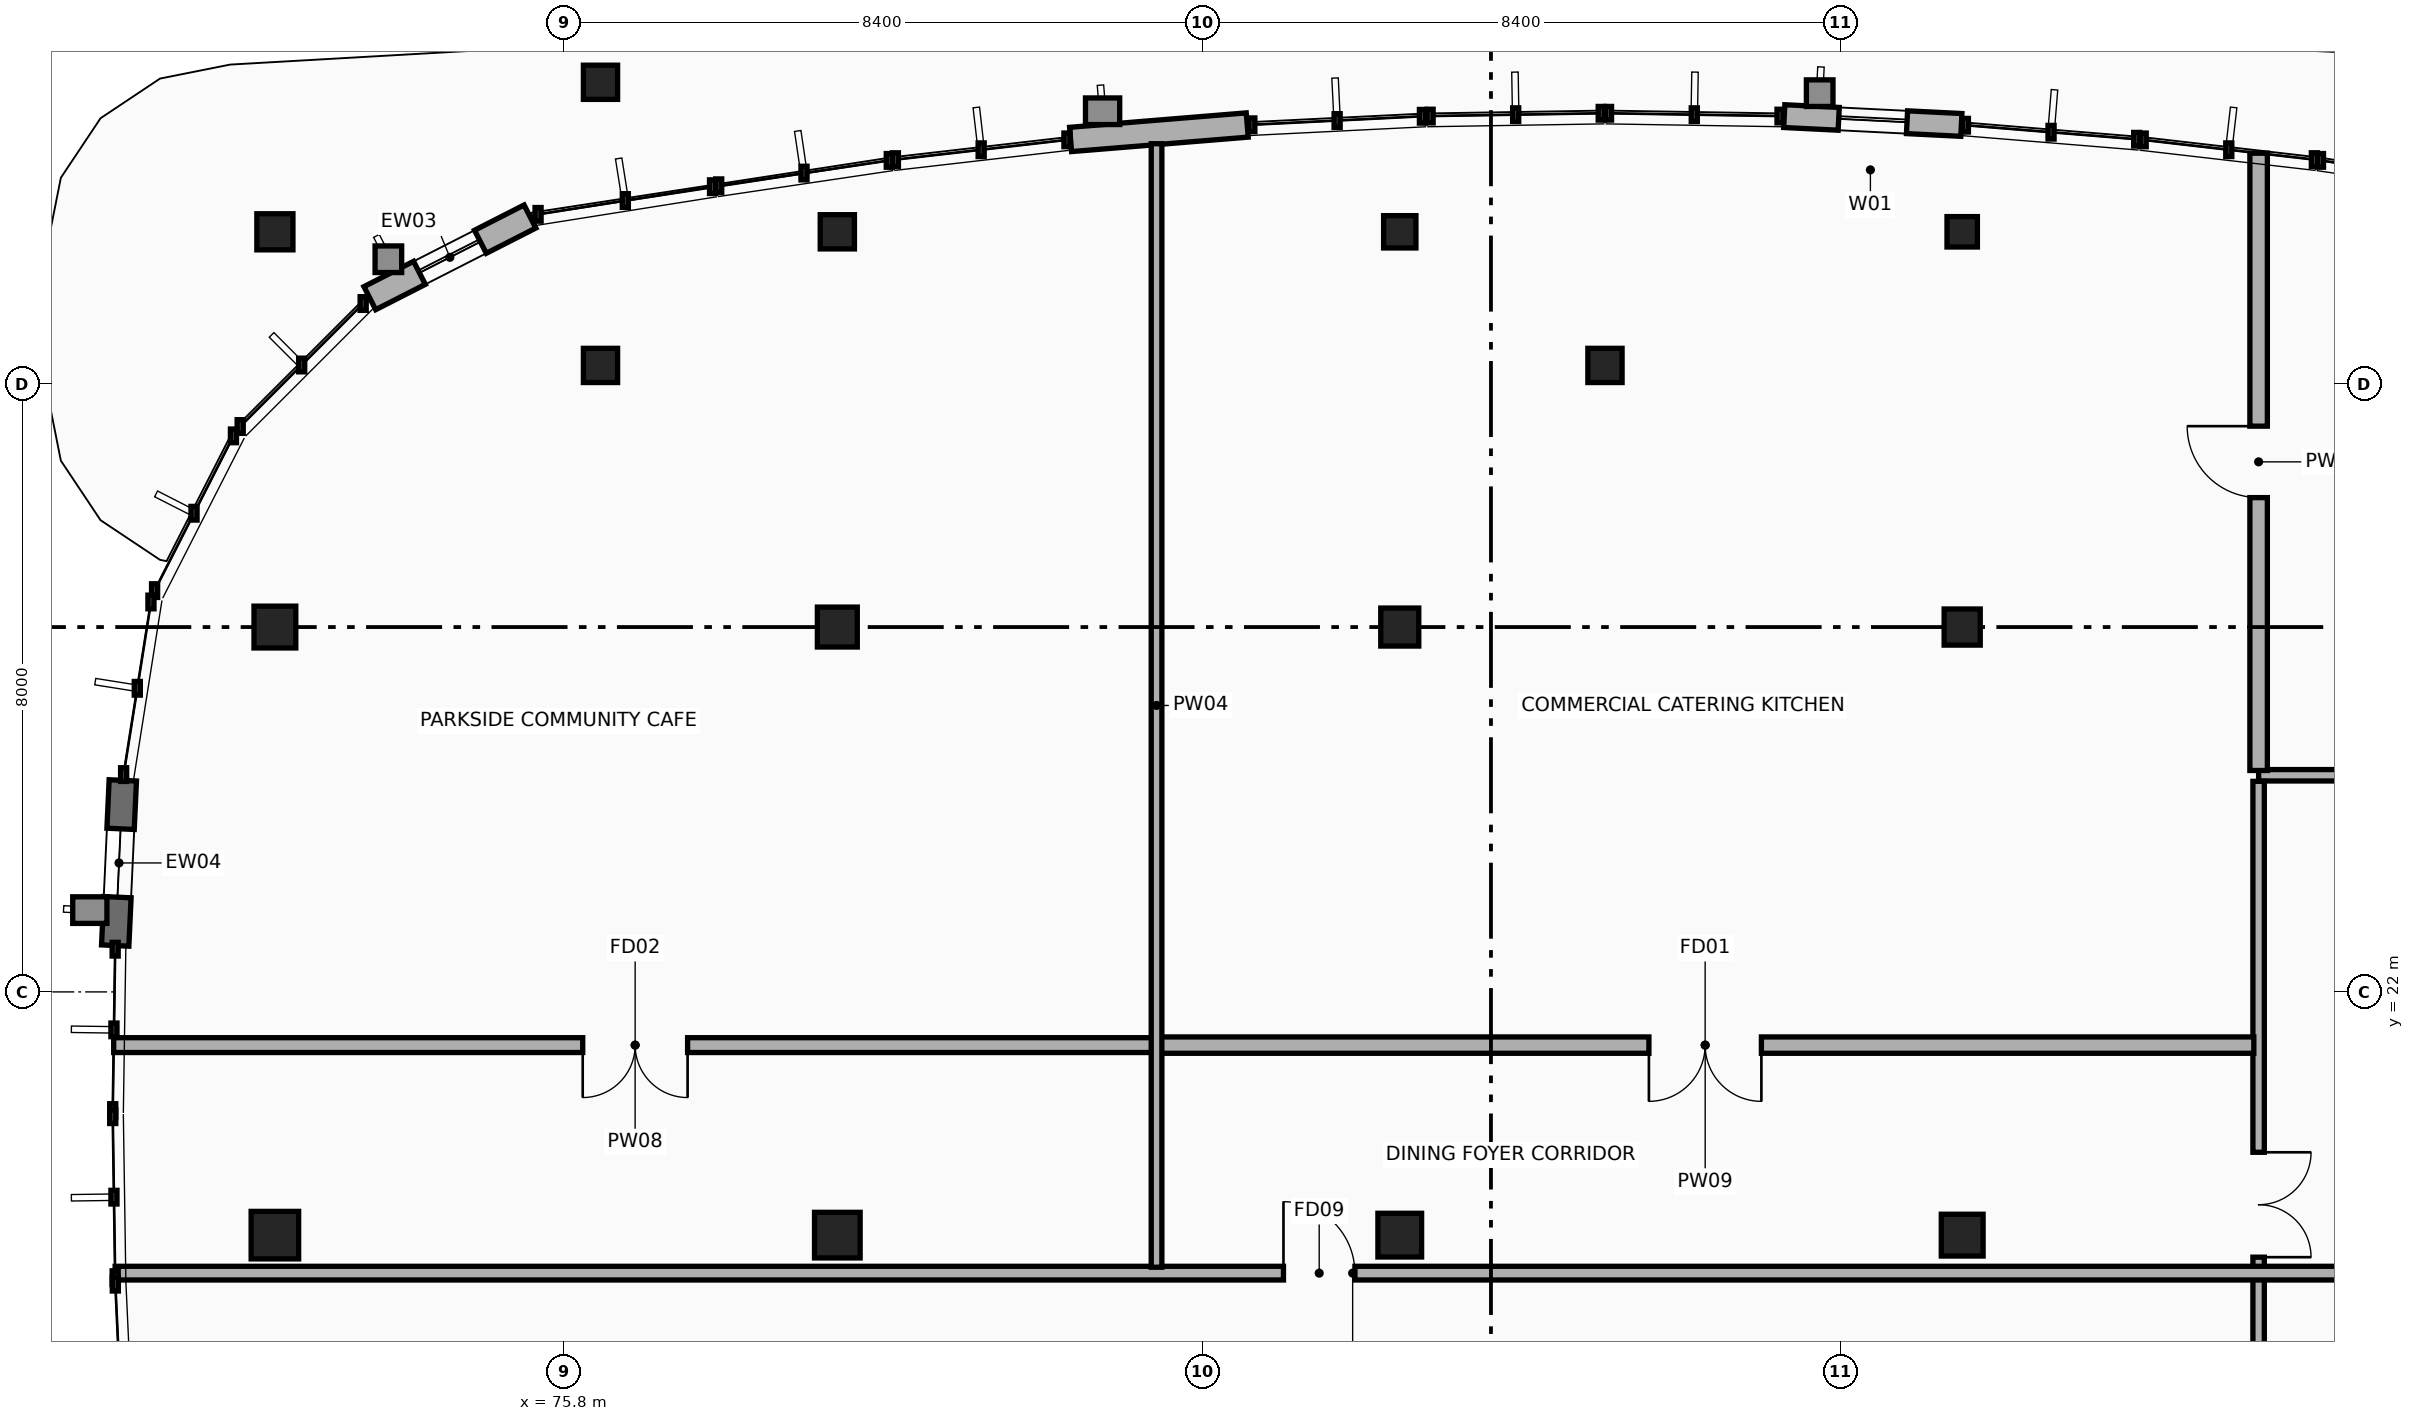
"""IFC4 building model, lengths in metres.
Left out: names, types, materials, properties, quantities, classifications, styles, units other than length and angle.
Written with IfcOpenShell. Run it as: python <this file> out.ifc"""

import sys

from ifc_helpers import new_model, si_unit, direction, frame, frame_2d, origin, origin_2d, place, context, subcontext, project, spatial, rectangle, extrude, element, fill, save


model = new_model("IFC4")
c1 = context("Model", 3, precision=1e-05, world=origin(), true_north=direction((0.0, 1.0)))
c2 = subcontext(c1, "Body", "Model", "MODEL_VIEW")
j1 = project(units=[si_unit("LENGTHUNIT", "METRE"), si_unit("PLANEANGLEUNIT", "RADIAN")], contexts=[c1])
p1 = place(None, origin())
s1 = spatial("IfcSite", under=j1, at=p1, CompositionType="ELEMENT")
p2 = place(p1, origin())
s2 = spatial("IfcBuilding", under=s1, at=p2, CompositionType="ELEMENT")
p3 = place(p2, origin())
s3 = spatial("IfcBuildingStorey", under=s2, at=p3, CompositionType="ELEMENT", Elevation=0.0)
p4 = place(p3, frame((72.0, 18.8, 0.0), z_axis=(0.0, 0.0, 1.0), x_axis=(1.0, 0.0, 0.0)))
e1 = element("IfcColumn", 1, at=p4, inside=s3, PredefinedType="COLUMN", context=c2, shape_type="SweptSolid", body=[
    extrude(rectangle(XDim=0.625, YDim=0.625, at=origin_2d()), origin(), (0.0, 0.0, 1.0), 4.8),
])
p5 = place(p3, frame((72.0, 26.8, 0.0), z_axis=(0.0, 0.0, 1.0), x_axis=(1.0, 0.0, 0.0)))
e2 = element("IfcColumn", 2, at=p5, inside=s3, PredefinedType="COLUMN", context=c2, shape_type="SweptSolid", body=[
    extrude(rectangle(XDim=0.55, YDim=0.55, at=origin_2d()), origin(), (0.0, 0.0, 1.0), 4.8),
])
p6 = place(p3, frame((72.0, 32.0, 0.0), z_axis=(0.0, 0.0, 1.0), x_axis=(1.0, 0.0, 0.0)))
e3 = element("IfcColumn", 3, at=p6, inside=s3, PredefinedType="COLUMN", context=c2, shape_type="SweptSolid", body=[
    extrude(rectangle(XDim=0.475, YDim=0.475, at=origin_2d()), origin(), (0.0, 0.0, 1.0), 4.8),
])
p7 = place(p3, frame((79.4, 18.8, 0.0), z_axis=(0.0, 0.0, 1.0), x_axis=(1.0, 0.0, 0.0)))
e4 = element("IfcColumn", 4, at=p7, inside=s3, PredefinedType="COLUMN", context=c2, shape_type="SweptSolid", body=[
    extrude(rectangle(XDim=0.6, YDim=0.6, at=origin_2d()), origin(), (0.0, 0.0, 1.0), 4.8),
])
p8 = place(p3, frame((79.4, 26.8, 0.0), z_axis=(0.0, 0.0, 1.0), x_axis=(1.0, 0.0, 0.0)))
e5 = element("IfcColumn", 5, at=p8, inside=s3, PredefinedType="COLUMN", context=c2, shape_type="SweptSolid", body=[
    extrude(rectangle(XDim=0.525, YDim=0.525, at=origin_2d()), origin(), (0.0, 0.0, 1.0), 4.8),
])
p9 = place(p3, frame((79.4, 32.0, 0.0), z_axis=(0.0, 0.0, 1.0), x_axis=(1.0, 0.0, 0.0)))
e6 = element("IfcColumn", 6, at=p9, inside=s3, PredefinedType="COLUMN", context=c2, shape_type="SweptSolid", body=[
    extrude(rectangle(XDim=0.45, YDim=0.45, at=origin_2d()), origin(), (0.0, 0.0, 1.0), 4.8),
])
p10 = place(p3, frame((86.8, 18.8, 0.0), z_axis=(0.0, 0.0, 1.0), x_axis=(1.0, 0.0, 0.0)))
e7 = element("IfcColumn", 7, at=p10, inside=s3, PredefinedType="COLUMN", context=c2, shape_type="SweptSolid", body=[
    extrude(rectangle(XDim=0.575, YDim=0.575, at=origin_2d()), origin(), (0.0, 0.0, 1.0), 4.8),
])
p11 = place(p3, frame((86.8, 26.8, 0.0), z_axis=(0.0, 0.0, 1.0), x_axis=(1.0, 0.0, 0.0)))
e8 = element("IfcColumn", 8, at=p11, inside=s3, PredefinedType="COLUMN", context=c2, shape_type="SweptSolid", body=[
    extrude(rectangle(XDim=0.5, YDim=0.5, at=origin_2d()), origin(), (0.0, 0.0, 1.0), 4.8),
])
p12 = place(p3, frame((86.8, 32.0, 0.0), z_axis=(0.0, 0.0, 1.0), x_axis=(1.0, 0.0, 0.0)))
e9 = element("IfcColumn", 9, at=p12, inside=s3, PredefinedType="COLUMN", context=c2, shape_type="SweptSolid", body=[
    extrude(rectangle(XDim=0.425, YDim=0.425, at=origin_2d()), origin(), (0.0, 0.0, 1.0), 4.8),
])
p13 = place(p3, frame((94.2, 18.8, 0.0), z_axis=(0.0, 0.0, 1.0), x_axis=(1.0, 0.0, 0.0)))
e10 = element("IfcColumn", 10, at=p13, inside=s3, PredefinedType="COLUMN", context=c2, shape_type="SweptSolid", body=[
    extrude(rectangle(XDim=0.55, YDim=0.55, at=origin_2d()), origin(), (0.0, 0.0, 1.0), 4.8),
])
p14 = place(p3, frame((94.2, 26.8, 0.0), z_axis=(0.0, 0.0, 1.0), x_axis=(1.0, 0.0, 0.0)))
e11 = element("IfcColumn", 11, at=p14, inside=s3, PredefinedType="COLUMN", context=c2, shape_type="SweptSolid", body=[
    extrude(rectangle(XDim=0.475, YDim=0.475, at=origin_2d()), origin(), (0.0, 0.0, 1.0), 4.8),
])
p15 = place(p3, frame((94.2, 32.0, 0.0), z_axis=(0.0, 0.0, 1.0), x_axis=(1.0, 0.0, 0.0)))
e12 = element("IfcColumn", 12, at=p15, inside=s3, PredefinedType="COLUMN", context=c2, shape_type="SweptSolid", body=[
    extrude(rectangle(XDim=0.4, YDim=0.4, at=origin_2d()), origin(), (0.0, 0.0, 1.0), 4.8),
])
for number, where, z_axis, x_axis in (
    (13, (76.284, 30.242, 0.0), (0.0, 0.0, 1.0), (1.0, 0.0, 0.0)),
    (14, (76.284, 33.967, 0.0), (0.0, 0.0, 1.0), (1.0, 0.0, 0.0)),
    (15, (89.5, 30.242, 0.0), (0.0, 0.0, 1.0), (1.0, 0.0, 0.0)),
):
    element("IfcColumn", number, at=place(p3, frame(where, z_axis=z_axis, x_axis=x_axis)), inside=s3, PredefinedType="COLUMN", context=c2, shape_type="SweptSolid", body=[
        extrude(rectangle(XDim=0.45, YDim=0.45, at=origin_2d()), origin(), (0.0, 0.0, 1.0), 4.553),
    ])
p16 = place(p3, frame((91.859, 33.522, 0.0), z_axis=(0.0, 0.0, 1.0), x_axis=(0.998763795086, -0.049707963398, 0.0)))
e16 = element("IfcWall", 16, at=p16, inside=s3, PredefinedType="STANDARD", context=c2, shape_type="SweptSolid", body=[
    extrude(rectangle(XDim=2.333, YDim=0.3, at=frame_2d((1.167, 0.0))), origin(), (0.0, 0.0, 1.0), 4.537),
])
p17 = place(p16, frame((0.717, 0.0, 0.9)))
e17 = element("IfcOpeningElement", 17, at=p17, cuts=e16, PredefinedType="OPENING", context=c2, shape_type="SweptSolid", body=[
    extrude(rectangle(XDim=0.9, YDim=1.2, at=frame_2d((0.45, 0.6))), frame((0.0, 0.16, 0.0), z_axis=(0.0, -1.0, 0.0), x_axis=(1.0, 0.0, 0.0)), (0.0, 0.0, 1.0), 0.32),
])
p18 = place(p3, frame((82.469, 33.215, 0.0), z_axis=(0.0, 0.0, 1.0), x_axis=(0.996676640199, 0.081459651862, 0.0)))
e18 = element("IfcWall", 18, at=p18, inside=s3, PredefinedType="STANDARD", context=c2, shape_type="SweptSolid", body=[
    extrude(rectangle(XDim=2.332, YDim=0.32, at=frame_2d((1.166, 0.0))), origin(), (0.0, 0.0, 1.0), 4.537),
])
p19 = place(p3, frame((73.249, 31.127, 0.0), z_axis=(0.0, 0.0, 1.0), x_axis=(0.890931537231, 0.454137639893, 0.0)))
e19 = element("IfcWall", 19, at=p19, inside=s3, PredefinedType="STANDARD", context=c2, shape_type="SweptSolid", body=[
    extrude(rectangle(XDim=2.365, YDim=0.34, at=frame_2d((1.182, 0.0))), origin(), (0.0, 0.0, 1.0), 4.116),
])
p20 = place(p19, frame((0.733, 0.0, 0.9)))
e20 = element("IfcOpeningElement", 20, at=p20, cuts=e19, PredefinedType="OPENING", context=c2, shape_type="SweptSolid", body=[
    extrude(rectangle(XDim=0.9, YDim=1.2, at=frame_2d((0.45, 0.6))), frame((0.0, 0.18, 0.0), z_axis=(0.0, -1.0, 0.0), x_axis=(1.0, 0.0, 0.0)), (0.0, 0.0, 1.0), 0.36),
])
p21 = place(p3, frame((69.899, 22.61, 0.0), z_axis=(0.0, 0.0, 1.0), x_axis=(0.046018611105, 0.998940582533, 0.0)))
e21 = element("IfcWall", 21, at=p21, inside=s3, PredefinedType="STANDARD", context=c2, shape_type="SweptSolid", body=[
    extrude(rectangle(XDim=2.175, YDim=0.36, at=frame_2d((1.087, 0.0))), origin(), (0.0, 0.0, 1.0), 4.512),
])
p22 = place(p21, frame((0.637, 0.0, 0.9)))
e22 = element("IfcOpeningElement", 22, at=p22, cuts=e21, PredefinedType="OPENING", context=c2, shape_type="SweptSolid", body=[
    extrude(rectangle(XDim=0.9, YDim=1.2, at=frame_2d((0.45, 0.6))), frame((0.0, 0.19, 0.0), z_axis=(0.0, -1.0, 0.0), x_axis=(1.0, 0.0, 0.0)), (0.0, 0.0, 1.0), 0.38),
])
p23 = place(p3, frame((102.465, 24.85, 0.0), z_axis=(0.0, 0.0, 1.0), x_axis=(-1.0, 0.0, 0.0)))
e23 = element("IfcWall", 23, at=p23, inside=s3, PredefinedType="PARTITIONING", context=c2, shape_type="SweptSolid", body=[
    extrude(rectangle(XDim=4.365, YDim=0.15, at=frame_2d((2.183, 0.0))), origin(), (0.0, 0.0, 1.0), 3.88),
])
p24 = place(p3, frame((98.1, 24.77, 0.0), z_axis=(0.0, 0.0, 1.0), x_axis=(0.0, -1.0, 0.0)))
e24 = element("IfcWall", 24, at=p24, inside=s3, PredefinedType="PARTITIONING", context=c2, shape_type="SweptSolid", body=[
    extrude(rectangle(XDim=11.14, YDim=0.15, at=frame_2d((5.57, 0.0))), origin(), (0.0, 0.0, 1.0), 4.117),
])
p25 = place(p24, frame((4.88, 0.0, 0.0)))
e25 = element("IfcOpeningElement", 25, at=p25, cuts=e24, PredefinedType="OPENING", context=c2, shape_type="SweptSolid", body=[
    extrude(rectangle(XDim=1.38, YDim=2.2, at=frame_2d((0.69, 1.1))), frame((0.0, 0.085, 0.0), z_axis=(0.0, -1.0, 0.0), x_axis=(1.0, 0.0, 0.0)), (0.0, 0.0, 1.0), 0.17),
])
p26 = place(p3, frame((69.898, 18.3, 0.0), z_axis=(0.0, 0.0, 1.0), x_axis=(1.0, 0.0, 0.0)))
e26 = element("IfcWall", 26, at=p26, inside=s3, PredefinedType="PARTITIONING", context=c2, shape_type="SweptSolid", body=[
    extrude(rectangle(XDim=32.564, YDim=0.18, at=frame_2d((16.282, 0.0))), origin(), (0.0, 0.0, 1.0), 3.93),
])
p27 = place(p26, frame((15.372, 0.0, 0.0)))
e27 = element("IfcOpeningElement", 27, at=p27, cuts=e26, PredefinedType="OPENING", context=c2, shape_type="SweptSolid", body=[
    extrude(rectangle(XDim=0.94, YDim=2.1, at=frame_2d((0.47, 1.05))), frame((0.0, 0.1, 0.0), z_axis=(0.0, -1.0, 0.0), x_axis=(1.0, 0.0, 0.0)), (0.0, 0.0, 1.0), 0.2),
])
p28 = place(p3, frame((83.6, 21.3, 0.0), z_axis=(0.0, 0.0, 1.0), x_axis=(-1.0, 0.0, 0.0)))
e28 = element("IfcWall", 28, at=p28, inside=s3, PredefinedType="PARTITIONING", context=c2, shape_type="SweptSolid", body=[
    extrude(rectangle(XDim=13.721, YDim=0.195, at=frame_2d((6.861, 0.0))), origin(), (0.0, 0.0, 1.0), 3.98),
])
p29 = place(p28, frame((6.17, 0.0, 0.0)))
e29 = element("IfcOpeningElement", 29, at=p29, cuts=e28, PredefinedType="OPENING", context=c2, shape_type="SweptSolid", body=[
    extrude(rectangle(XDim=1.38, YDim=2.2, at=frame_2d((0.69, 1.1))), frame((0.0, 0.107, 0.0), z_axis=(0.0, -1.0, 0.0), x_axis=(1.0, 0.0, 0.0)), (0.0, 0.0, 1.0), 0.215),
])
p30 = place(p3, frame((98.037, 21.3, 0.0), z_axis=(0.0, 0.0, 1.0), x_axis=(-1.0, 0.0, 0.0)))
e30 = element("IfcWall", 30, at=p30, inside=s3, PredefinedType="PARTITIONING", context=c2, shape_type="SweptSolid", body=[
    extrude(rectangle(XDim=14.437, YDim=0.215, at=frame_2d((7.219, 0.0))), origin(), (0.0, 0.0, 1.0), 3.93),
])
p31 = place(p30, frame((6.479, 0.0, 0.0)))
e31 = element("IfcOpeningElement", 31, at=p31, cuts=e30, PredefinedType="OPENING", context=c2, shape_type="SweptSolid", body=[
    extrude(rectangle(XDim=1.48, YDim=2.22, at=frame_2d((0.74, 1.11))), frame((0.0, 0.117, 0.0), z_axis=(0.0, -1.0, 0.0), x_axis=(1.0, 0.0, 0.0)), (0.0, 0.0, 1.0), 0.235),
])
p32 = place(p3, frame((98.1, 24.913, 0.0), z_axis=(0.0, 0.0, 1.0), x_axis=(0.0, 1.0, 0.0)))
e32 = element("IfcWall", 32, at=p32, inside=s3, PredefinedType="PARTITIONING", context=c2, shape_type="SweptSolid", body=[
    extrude(rectangle(XDim=8.121, YDim=0.23, at=frame_2d((4.061, 0.0))), origin(), (0.0, 0.0, 1.0), 4.068),
])
p33 = place(p32, frame((3.59, 0.0, 0.0)))
e33 = element("IfcOpeningElement", 33, at=p33, cuts=e32, PredefinedType="OPENING", context=c2, shape_type="SweptSolid", body=[
    extrude(rectangle(XDim=0.94, YDim=2.1, at=frame_2d((0.47, 1.05))), frame((0.0, 0.125, 0.0), z_axis=(0.0, -1.0, 0.0), x_axis=(1.0, 0.0, 0.0)), (0.0, 0.0, 1.0), 0.25),
])
p34 = place(p3, frame((83.6, 18.378, 0.0), z_axis=(0.0, 0.0, 1.0), x_axis=(0.0, 1.0, 0.0)))
e34 = element("IfcWall", 34, at=p34, inside=s3, PredefinedType="PARTITIONING", context=c2, shape_type="SweptSolid", body=[
    extrude(rectangle(XDim=14.781, YDim=0.14, at=frame_2d((7.391, 0.0))), origin(), (0.0, 0.0, 1.0), 4.112),
])
p35 = place(p17, origin())
e35 = element("IfcWindow", 35, at=p35, inside=s3, PartitioningType="SINGLE_PANEL", PredefinedType="WINDOW", context=c2, shape_type="SweptSolid", body=[
    extrude(rectangle(XDim=0.9, YDim=1.2, at=frame_2d((0.45, 0.6))), frame((0.0, 0.03, 0.0), z_axis=(0.0, -1.0, 0.0), x_axis=(1.0, 0.0, 0.0)), (0.0, 0.0, 1.0), 0.06),
])
fill(e17, e35)
p36 = place(p20, origin())
e36 = element("IfcWindow", 36, at=p36, inside=s3, PartitioningType="SINGLE_PANEL", PredefinedType="WINDOW", context=c2, shape_type="SweptSolid", body=[
    extrude(rectangle(XDim=0.9, YDim=1.2, at=frame_2d((0.45, 0.6))), frame((0.0, 0.03, 0.0), z_axis=(0.0, -1.0, 0.0), x_axis=(1.0, 0.0, 0.0)), (0.0, 0.0, 1.0), 0.06),
])
fill(e20, e36)
p37 = place(p22, origin())
e37 = element("IfcWindow", 37, at=p37, inside=s3, PartitioningType="SINGLE_PANEL", PredefinedType="WINDOW", context=c2, shape_type="SweptSolid", body=[
    extrude(rectangle(XDim=0.9, YDim=1.2, at=frame_2d((0.45, 0.6))), frame((0.0, 0.03, 0.0), z_axis=(0.0, -1.0, 0.0), x_axis=(1.0, 0.0, 0.0)), (0.0, 0.0, 1.0), 0.06),
])
fill(e22, e37)
p38 = place(p25, origin())
e38 = element("IfcDoor", 38, at=p38, inside=s3, OperationType="DOUBLE_DOOR_SINGLE_SWING", PredefinedType="DOOR", context=c2, shape_type="SweptSolid", body=[
    extrude(rectangle(XDim=1.38, YDim=2.2, at=frame_2d((0.69, 1.1))), frame((0.0, 0.025, 0.0), z_axis=(0.0, -1.0, 0.0), x_axis=(1.0, 0.0, 0.0)), (0.0, 0.0, 1.0), 0.05),
])
fill(e25, e38)
p39 = place(p27, origin())
e39 = element("IfcDoor", 39, at=p39, inside=s3, OperationType="SINGLE_SWING_LEFT", PredefinedType="DOOR", context=c2, shape_type="SweptSolid", body=[
    extrude(rectangle(XDim=0.94, YDim=2.1, at=frame_2d((0.47, 1.05))), frame((0.0, 0.025, 0.0), z_axis=(0.0, -1.0, 0.0), x_axis=(1.0, 0.0, 0.0)), (0.0, 0.0, 1.0), 0.05),
])
fill(e27, e39)
p40 = place(p29, origin())
e40 = element("IfcDoor", 40, at=p40, inside=s3, OperationType="DOUBLE_DOOR_SINGLE_SWING", PredefinedType="DOOR", context=c2, shape_type="SweptSolid", body=[
    extrude(rectangle(XDim=1.38, YDim=2.2, at=frame_2d((0.69, 1.1))), frame((0.0, 0.025, 0.0), z_axis=(0.0, -1.0, 0.0), x_axis=(1.0, 0.0, 0.0)), (0.0, 0.0, 1.0), 0.05),
])
fill(e29, e40)
p41 = place(p31, origin())
e41 = element("IfcDoor", 41, at=p41, inside=s3, OperationType="DOUBLE_DOOR_SINGLE_SWING", PredefinedType="DOOR", context=c2, shape_type="SweptSolid", body=[
    extrude(rectangle(XDim=1.48, YDim=2.22, at=frame_2d((0.74, 1.11))), frame((0.0, 0.025, 0.0), z_axis=(0.0, -1.0, 0.0), x_axis=(1.0, 0.0, 0.0)), (0.0, 0.0, 1.0), 0.05),
])
fill(e31, e41)
p42 = place(p33, origin())
e42 = element("IfcDoor", 42, at=p42, inside=s3, OperationType="SINGLE_SWING_RIGHT", PredefinedType="DOOR", context=c2, shape_type="SweptSolid", body=[
    extrude(rectangle(XDim=0.94, YDim=2.1, at=frame_2d((0.47, 1.05))), frame((0.0, 0.025, 0.0), z_axis=(0.0, -1.0, 0.0), x_axis=(1.0, 0.0, 0.0)), (0.0, 0.0, 1.0), 0.05),
])
fill(e33, e42)
save(model, sys.argv[1])
